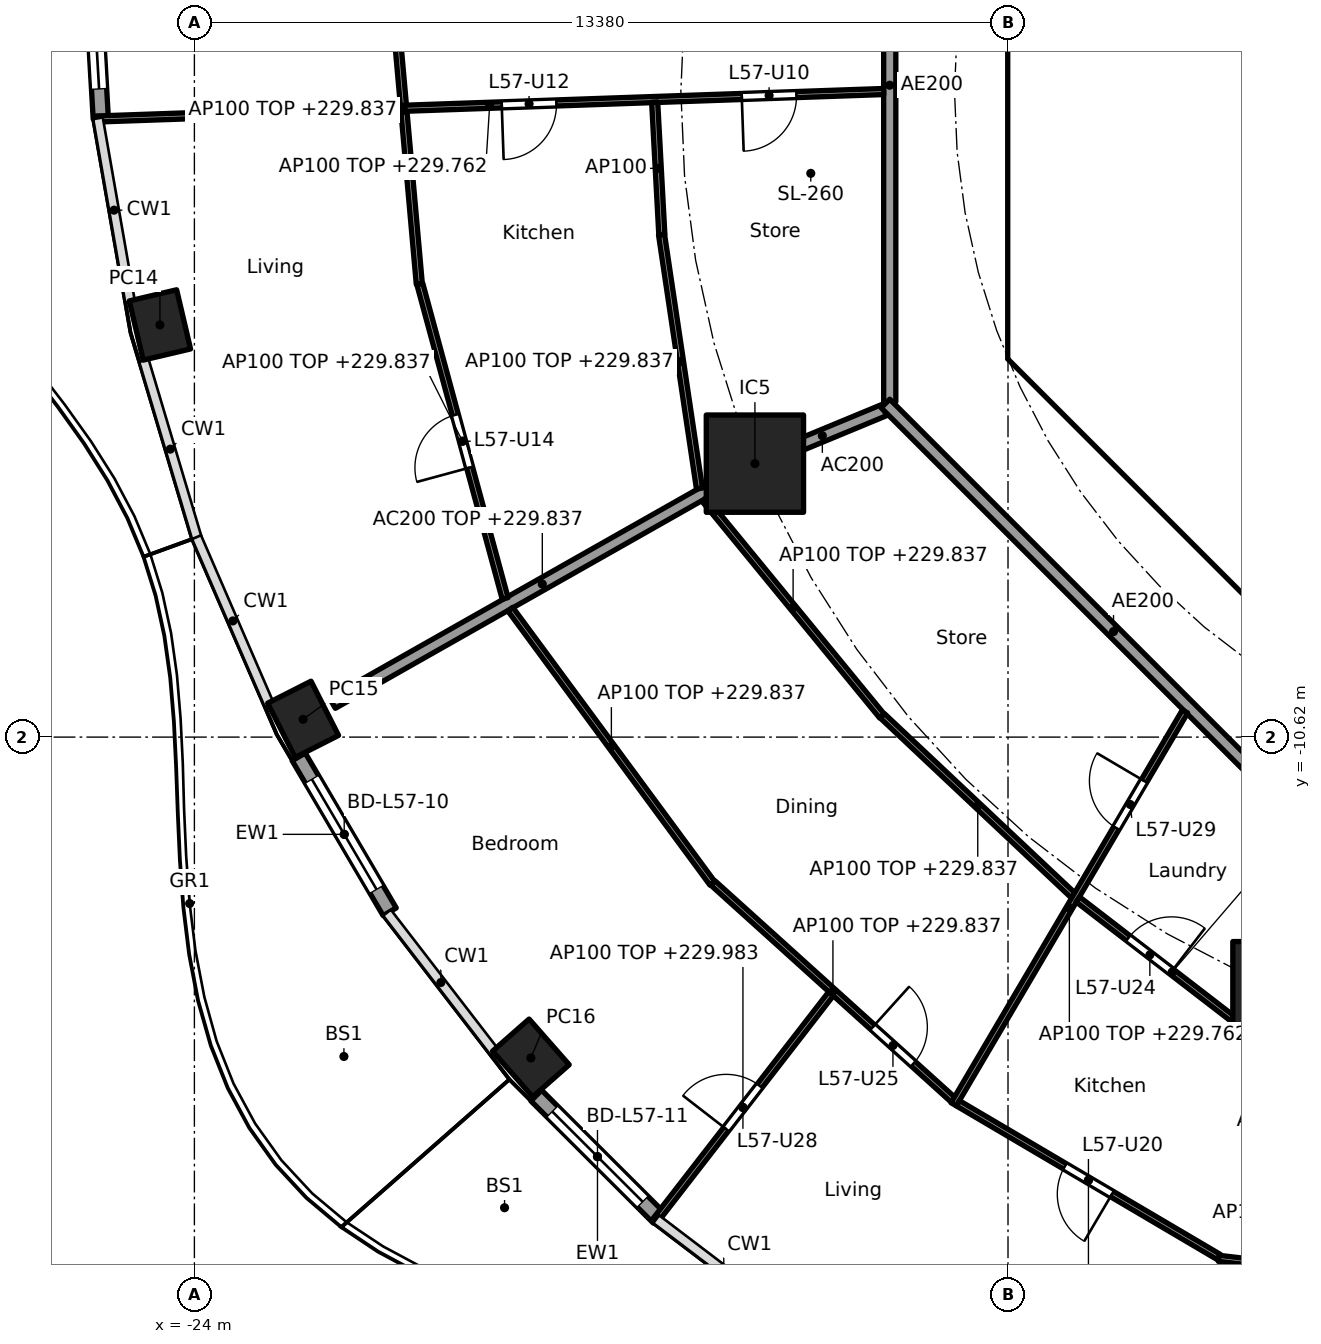
"""IFC4 building model, lengths in metres.
Left out: names, types, materials, properties, quantities, classifications, styles, units other than length and angle.
Written with IfcOpenShell. Run it as: python <this file> out.ifc"""

import sys

from ifc_helpers import new_model, si_unit, direction, frame, frame_2d, origin, origin_2d, place, context, subcontext, project, spatial, polyline, rectangle, hollow_rectangle, outline, extrude, element, fill, save


model = new_model("IFC4")
c1 = context("Model", 3, precision=1e-05, world=origin(), true_north=direction((0.0, 1.0)))
c2 = subcontext(c1, "Body", "Model", "MODEL_VIEW")
j1 = project(units=[si_unit("LENGTHUNIT", "METRE"), si_unit("PLANEANGLEUNIT", "RADIAN")], contexts=[c1])
p1 = place(None, origin())
s1 = spatial("IfcSite", under=j1, at=p1, CompositionType="ELEMENT")
p2 = place(p1, origin())
s2 = spatial("IfcBuilding", under=s1, at=p2, CompositionType="ELEMENT")
p3 = place(p2, frame((0.0, 0.0, 227.0)))
s3 = spatial("IfcBuildingStorey", under=s2, at=p3, CompositionType="ELEMENT", Elevation=227.0)
for number, where, z_axis, x_axis in (
    (1, (-24.567, -3.842, 0.0), (0.0, 0.0, 1.0), (0.229, -0.973, 0.0)),
    (2, (-22.212, -10.327, 0.0), (0.0, 0.0, 1.0), (0.452, -0.892, 0.0)),
    (3, (-18.467, -15.896, 0.0), (0.0, 0.0, 1.0), (0.66, -0.751, 0.0)),
):
    element("IfcColumn", number, at=place(p3, frame(where, z_axis=z_axis, x_axis=x_axis)), inside=s3, PredefinedType="COLUMN", context=c2, shape_type="SweptSolid", body=[
        extrude(hollow_rectangle(XDim=1.0, YDim=0.8, WallThickness=0.032, at=origin_2d()), origin(), (0.0, 0.0, 1.0), 3.7),
    ])
for number, where, z_axis, x_axis in (
    (4, (-14.782, -6.123, 0.0), (0.0, 0.0, 1.0), (1.0, 0.0, 0.0)),
    (5, (-6.123, -14.782, 0.0), (0.0, 0.0, 1.0), (1.0, 0.0, 0.0)),
):
    element("IfcColumn", number, at=place(p3, frame(where, z_axis=z_axis, x_axis=x_axis)), inside=s3, PredefinedType="COLUMN", context=c2, shape_type="SweptSolid", body=[
        extrude(rectangle(XDim=1.6, YDim=1.6, at=origin_2d()), origin(), (0.0, 0.0, 1.0), 3.7),
    ])
p4 = place(p3, frame((-25.539, -0.45, 0.0), z_axis=(0.0, 0.0, 1.0), x_axis=(-0.057528189427, 0.998343882348, 0.0)))
e6 = element("IfcWall", 6, at=p4, inside=s3, PredefinedType="SOLIDWALL", context=c2, shape_type="SweptSolid", body=[
    extrude(rectangle(XDim=3.081, YDim=0.25, at=frame_2d((1.541, 0.0))), origin(), (0.0, 0.0, 1.0), 3.44),
])
p5 = place(p4, frame((0.49, 0.0, 0.0)))
e7 = element("IfcOpeningElement", 7, at=p5, cuts=e6, PredefinedType="OPENING", context=c2, shape_type="SweptSolid", body=[
    extrude(rectangle(XDim=2.1, YDim=2.4, at=frame_2d((1.05, 1.2))), frame((0.0, 0.135, 0.0), z_axis=(0.0, -1.0, 0.0), x_axis=(1.0, 0.0, 0.0)), (0.0, 0.0, 1.0), 0.27),
])
p6 = place(p3, frame((-20.788, -13.493, 0.0), z_axis=(0.0, 0.0, 1.0), x_axis=(-0.506294090973, 0.862360883532, 0.0)))
e8 = element("IfcWall", 8, at=p6, inside=s3, PredefinedType="SOLIDWALL", context=c2, shape_type="SweptSolid", body=[
    extrude(rectangle(XDim=2.955, YDim=0.25, at=frame_2d((1.477, 0.0))), origin(), (0.0, 0.0, 1.0), 3.44),
])
p7 = place(p6, frame((0.427, 0.0, 0.0)))
e9 = element("IfcOpeningElement", 9, at=p7, cuts=e8, PredefinedType="OPENING", context=c2, shape_type="SweptSolid", body=[
    extrude(rectangle(XDim=2.1, YDim=2.4, at=frame_2d((1.05, 1.2))), frame((0.0, 0.135, 0.0), z_axis=(0.0, -1.0, 0.0), x_axis=(1.0, 0.0, 0.0)), (0.0, 0.0, 1.0), 0.27),
])
p8 = place(p3, frame((-16.365, -18.524, 0.0), z_axis=(0.0, 0.0, 1.0), x_axis=(-0.707878871612, 0.706333846793, 0.0)))
e10 = element("IfcWall", 10, at=p8, inside=s3, PredefinedType="SOLIDWALL", context=c2, shape_type="SweptSolid", body=[
    extrude(rectangle(XDim=2.844, YDim=0.25, at=frame_2d((1.422, 0.0))), origin(), (0.0, 0.0, 1.0), 3.44),
])
p9 = place(p8, frame((0.372, 0.0, 0.0)))
e11 = element("IfcOpeningElement", 11, at=p9, cuts=e10, PredefinedType="OPENING", context=c2, shape_type="SweptSolid", body=[
    extrude(rectangle(XDim=2.1, YDim=2.4, at=frame_2d((1.05, 1.2))), frame((0.0, 0.135, 0.0), z_axis=(0.0, -1.0, 0.0), x_axis=(1.0, 0.0, 0.0)), (0.0, 0.0, 1.0), 0.27),
])
p10 = place(p3, frame((-10.325, 3.801, 0.0), z_axis=(0.0, 0.0, 1.0), x_axis=(0.0, -1.0, 0.0)))
e12 = element("IfcWall", 12, at=p10, inside=s3, PredefinedType="SHEAR", context=c2, shape_type="SweptSolid", body=[
    extrude(rectangle(XDim=7.602, YDim=0.6, at=frame_2d((3.801, 0.0))), origin(), (0.0, 0.0, 1.0), 3.44),
])
p11 = place(p10, frame((0.651, 0.0, 0.0)))
e13 = element("IfcOpeningElement", 13, at=p11, cuts=e12, PredefinedType="OPENING", context=c2, shape_type="SweptSolid", body=[
    extrude(rectangle(XDim=1.5, YDim=2.1, at=frame_2d((0.75, 1.05))), frame((0.0, 0.31, 0.0), z_axis=(0.0, -1.0, 0.0), x_axis=(1.0, 0.0, 0.0)), (0.0, 0.0, 1.0), 0.62),
])
p12 = place(p10, frame((5.451, 0.0, 0.0)))
e14 = element("IfcOpeningElement", 14, at=p12, cuts=e12, PredefinedType="OPENING", context=c2, shape_type="SweptSolid", body=[
    extrude(rectangle(XDim=1.5, YDim=2.1, at=frame_2d((0.75, 1.05))), frame((0.0, 0.31, 0.0), z_axis=(0.0, -1.0, 0.0), x_axis=(1.0, 0.0, 0.0)), (0.0, 0.0, 1.0), 0.62),
])
p13 = place(p3, frame((-9.988, -4.613, 0.0), z_axis=(0.0, 0.0, 1.0), x_axis=(0.707106781187, -0.707106781187, 0.0)))
e15 = element("IfcWall", 15, at=p13, inside=s3, PredefinedType="SHEAR", context=c2, shape_type="SweptSolid", body=[
    extrude(rectangle(XDim=7.602, YDim=0.6, at=frame_2d((3.801, 0.0))), origin(), (0.0, 0.0, 1.0), 3.44),
])
p14 = place(p13, frame((6.151, 0.0, 0.0)))
e16 = element("IfcOpeningElement", 16, at=p14, cuts=e15, PredefinedType="OPENING", context=c2, shape_type="SweptSolid", body=[
    extrude(rectangle(XDim=1.1, YDim=2.1, at=frame_2d((0.55, 1.05))), frame((0.0, 0.31, 0.0), z_axis=(0.0, -1.0, 0.0), x_axis=(1.0, 0.0, 0.0)), (0.0, 0.0, 1.0), 0.62),
])
p15 = place(p3, origin())
e17 = element("IfcWall", 17, at=p15, inside=s3, PredefinedType="SHEAR", context=c2, shape_type="SweptSolid", body=[
    extrude(outline(polyline([(-10.625, -3.801), (-10.025, -3.801), (-10.025, -4.152), (-9.776, -4.401), (-10.2, -4.825), (-10.625, -4.401), (-10.625, -3.801)])), origin(), (0.0, 0.0, 1.0), 3.44),
])
p16 = place(p3, frame((-10.025, -4.0, 0.0), z_axis=(0.0, 0.0, 1.0), x_axis=(1.0, 0.0, 0.0)))
e18 = element("IfcWall", 18, at=p16, inside=s3, PredefinedType="PARTITIONING", context=c2, shape_type="SweptSolid", body=[
    extrude(rectangle(XDim=3.325, YDim=0.2, at=frame_2d((1.662, 0.0))), origin(), (0.0, 0.0, 1.0), 3.44),
])
p17 = place(p3, frame((-12.657, -5.243, 0.0), z_axis=(0.0, 0.0, 1.0), x_axis=(-0.923859888513, -0.38273085373, 0.0)))
e19 = element("IfcWall", 19, at=p17, inside=s3, PredefinedType="PARTITIONING", context=c2, shape_type="SweptSolid", body=[
    extrude(rectangle(XDim=2.199, YDim=0.2, at=frame_2d((1.1, 0.0))), origin(), (0.0, 0.0, 1.0), 3.44),
])
p18 = place(p3, frame((-14.825, -6.148, 0.0), z_axis=(0.0, 0.0, 1.0), x_axis=(-0.870099576105, -0.492875975944, 0.0)))
e20 = element("IfcWall", 20, at=p18, inside=s3, PredefinedType="PARTITIONING", context=c2, shape_type="SweptSolid", body=[
    extrude(rectangle(XDim=7.937, YDim=0.2, at=frame_2d((3.969, 0.0))), origin(), (0.0, 0.0, 1.0), 2.837),
])
p19 = place(p3, frame((-12.565, 5.304, 0.0), z_axis=(0.0, 0.0, 1.0), x_axis=(0.0, -1.0, 0.0)))
e21 = element("IfcWall", 21, at=p19, inside=s3, PredefinedType="PARTITIONING", context=c2, shape_type="SweptSolid", body=[
    extrude(rectangle(XDim=10.409, YDim=0.2, at=frame_2d((5.205, 0.0))), origin(), (0.0, 0.0, 1.0), 3.44),
])
p20 = place(p19, frame((3.07, 0.0, 0.0)))
e22 = element("IfcOpeningElement", 22, at=p20, cuts=e21, PredefinedType="OPENING", context=c2, shape_type="SweptSolid", body=[
    extrude(rectangle(XDim=1.0, YDim=2.1, at=frame_2d((0.5, 1.05))), frame((0.0, 0.11, 0.0), z_axis=(0.0, -1.0, 0.0), x_axis=(1.0, 0.0, 0.0)), (0.0, 0.0, 1.0), 0.22),
])
p21 = place(p3, frame((-12.635, -5.134, 0.0), z_axis=(0.0, 0.0, 1.0), x_axis=(0.707106781187, -0.707106781187, 0.0)))
e23 = element("IfcWall", 23, at=p21, inside=s3, PredefinedType="PARTITIONING", context=c2, shape_type="SweptSolid", body=[
    extrude(rectangle(XDim=10.609, YDim=0.2, at=frame_2d((5.305, 0.0))), origin(), (0.0, 0.0, 1.0), 3.44),
])
p22 = place(p3, frame((-20.81, 2.542, 0.0), z_axis=(0.0, 0.0, 1.0), x_axis=(0.088651453697, -0.996062708748, 0.0)))
e24 = element("IfcWall", 24, at=p22, inside=s3, PredefinedType="PARTITIONING", context=c2, shape_type="SweptSolid", body=[
    extrude(rectangle(XDim=5.737, YDim=0.1, at=frame_2d((2.868, 0.0))), origin(), (0.0, 0.0, 1.0), 2.837),
])
p23 = place(p3, frame((-12.665, -0.003, 0.0), z_axis=(0.0, 0.0, 1.0), x_axis=(-0.999390583608, -0.034906466382, 0.0)))
e25 = element("IfcWall", 25, at=p23, inside=s3, PredefinedType="PARTITIONING", context=c2, shape_type="SweptSolid", body=[
    extrude(rectangle(XDim=12.967, YDim=0.1, at=frame_2d((6.483, 0.0))), origin(), (0.0, 0.0, 1.0), 2.762),
])
p24 = place(p23, frame((1.435, 0.0, 0.0)))
e26 = element("IfcOpeningElement", 26, at=p24, cuts=e25, PredefinedType="OPENING", context=c2, shape_type="SweptSolid", body=[
    extrude(rectangle(XDim=0.9, YDim=2.1, at=frame_2d((0.45, 1.05))), frame((0.0, 0.06, 0.0), z_axis=(0.0, -1.0, 0.0), x_axis=(1.0, 0.0, 0.0)), (0.0, 0.0, 1.0), 0.12),
])
p25 = place(p23, frame((5.385, 0.0, 0.0)))
e27 = element("IfcOpeningElement", 27, at=p25, cuts=e25, PredefinedType="OPENING", context=c2, shape_type="SweptSolid", body=[
    extrude(rectangle(XDim=0.9, YDim=2.1, at=frame_2d((0.45, 1.05))), frame((0.0, 0.06, 0.0), z_axis=(0.0, -1.0, 0.0), x_axis=(1.0, 0.0, 0.0)), (0.0, 0.0, 1.0), 0.12),
])
p26 = place(p3, frame((-16.431, -0.178, 0.0), z_axis=(0.0, 0.0, 1.0), x_axis=(0.053951127036, -0.998543577362, 0.0)))
e28 = element("IfcWall", 28, at=p26, inside=s3, PredefinedType="PARTITIONING", context=c2, shape_type="SweptSolid", body=[
    extrude(rectangle(XDim=2.181, YDim=0.1, at=frame_2d((1.091, 0.0))), origin(), (0.0, 0.0, 1.0), 3.44),
])
p27 = place(p3, frame((-16.318, -2.356, 0.0), z_axis=(0.0, 0.0, 1.0), x_axis=(0.147684413341, -0.989034536331, 0.0)))
e29 = element("IfcWall", 29, at=p27, inside=s3, PredefinedType="PARTITIONING", context=c2, shape_type="SweptSolid", body=[
    extrude(rectangle(XDim=4.222, YDim=0.1, at=frame_2d((2.111, 0.0))), origin(), (0.0, 0.0, 1.0), 2.837),
])
p28 = place(p3, frame((-20.292, -3.17, 0.0), z_axis=(0.0, 0.0, 1.0), x_axis=(0.26187906236, -0.965100697698, 0.0)))
e30 = element("IfcWall", 30, at=p28, inside=s3, PredefinedType="PARTITIONING", context=c2, shape_type="SweptSolid", body=[
    extrude(rectangle(XDim=5.356, YDim=0.1, at=frame_2d((2.678, 0.0))), origin(), (0.0, 0.0, 1.0), 2.837),
])
p29 = place(p28, frame((2.228, 0.0, 0.0)))
e31 = element("IfcOpeningElement", 31, at=p29, cuts=e30, PredefinedType="OPENING", context=c2, shape_type="SweptSolid", body=[
    extrude(rectangle(XDim=0.9, YDim=2.1, at=frame_2d((0.45, 1.05))), frame((0.0, 0.06, 0.0), z_axis=(0.0, -1.0, 0.0), x_axis=(1.0, 0.0, 0.0)), (0.0, 0.0, 1.0), 0.12),
])
p30 = place(p3, frame((-15.616, -6.708, 0.0), z_axis=(0.0, 0.0, 1.0), x_axis=(0.634076422357, -0.773270386483, 0.0)))
e32 = element("IfcWall", 32, at=p30, inside=s3, PredefinedType="PARTITIONING", context=c2, shape_type="SweptSolid", body=[
    extrude(rectangle(XDim=4.611, YDim=0.1, at=frame_2d((2.306, 0.0))), origin(), (0.0, 0.0, 1.0), 2.837),
])
p31 = place(p3, frame((-18.804, -8.516, 0.0), z_axis=(0.0, 0.0, 1.0), x_axis=(0.593249583583, -0.805018590828, 0.0)))
e33 = element("IfcWall", 33, at=p31, inside=s3, PredefinedType="PARTITIONING", context=c2, shape_type="SweptSolid", body=[
    extrude(rectangle(XDim=5.602, YDim=0.1, at=frame_2d((2.801, 0.0))), origin(), (0.0, 0.0, 1.0), 2.837),
])
p32 = place(p3, frame((-12.688, -10.27, 0.0), z_axis=(0.0, 0.0, 1.0), x_axis=(0.728268142903, -0.685292282192, 0.0)))
e34 = element("IfcWall", 34, at=p32, inside=s3, PredefinedType="PARTITIONING", context=c2, shape_type="SweptSolid", body=[
    extrude(rectangle(XDim=4.312, YDim=0.1, at=frame_2d((2.156, 0.0))), origin(), (0.0, 0.0, 1.0), 2.837),
])
p33 = place(p3, frame((-15.474, -13.019, 0.0), z_axis=(0.0, 0.0, 1.0), x_axis=(0.742348572616, -0.670013878017, 0.0)))
e35 = element("IfcWall", 35, at=p33, inside=s3, PredefinedType="PARTITIONING", context=c2, shape_type="SweptSolid", body=[
    extrude(rectangle(XDim=5.319, YDim=0.1, at=frame_2d((2.66, 0.0))), origin(), (0.0, 0.0, 1.0), 2.837),
])
p34 = place(p33, frame((3.54, 0.0, 0.0)))
e36 = element("IfcOpeningElement", 36, at=p34, cuts=e35, PredefinedType="OPENING", context=c2, shape_type="SweptSolid", body=[
    extrude(rectangle(XDim=0.9, YDim=2.1, at=frame_2d((0.45, 1.05))), frame((0.0, 0.06, 0.0), z_axis=(0.0, -1.0, 0.0), x_axis=(1.0, 0.0, 0.0)), (0.0, 0.0, 1.0), 0.12),
])
p35 = place(p3, frame((-13.53, -14.84, 0.0), z_axis=(0.0, 0.0, 1.0), x_axis=(-0.612546685222, -0.790434411209, 0.0)))
e37 = element("IfcWall", 37, at=p35, inside=s3, PredefinedType="PARTITIONING", context=c2, shape_type="SweptSolid", body=[
    extrude(rectangle(XDim=4.732, YDim=0.1, at=frame_2d((2.366, 0.0))), origin(), (0.0, 0.0, 1.0), 2.983),
])
p36 = place(p35, frame((1.916, 0.0, 0.0)))
e38 = element("IfcOpeningElement", 38, at=p36, cuts=e37, PredefinedType="OPENING", context=c2, shape_type="SweptSolid", body=[
    extrude(rectangle(XDim=0.9, YDim=2.1, at=frame_2d((0.45, 1.05))), frame((0.0, 0.06, 0.0), z_axis=(0.0, -1.0, 0.0), x_axis=(1.0, 0.0, 0.0)), (0.0, 0.0, 1.0), 0.12),
])
p37 = place(p3, frame((-7.709, -10.198, 0.0), z_axis=(0.0, 0.0, 1.0), x_axis=(-0.507362999545, -0.861732433353, 0.0)))
e39 = element("IfcWall", 39, at=p37, inside=s3, PredefinedType="PARTITIONING", context=c2, shape_type="SweptSolid", body=[
    extrude(rectangle(XDim=7.499, YDim=0.1, at=frame_2d((3.749, 0.0))), origin(), (0.0, 0.0, 1.0), 2.762),
])
p38 = place(p37, frame((1.326, 0.0, 0.0)))
e40 = element("IfcOpeningElement", 40, at=p38, cuts=e39, PredefinedType="OPENING", context=c2, shape_type="SweptSolid", body=[
    extrude(rectangle(XDim=0.9, YDim=2.1, at=frame_2d((0.45, 1.05))), frame((0.0, 0.06, 0.0), z_axis=(0.0, -1.0, 0.0), x_axis=(1.0, 0.0, 0.0)), (0.0, 0.0, 1.0), 0.12),
])
p39 = place(p3, frame((-9.471, -13.289, 0.0), z_axis=(0.0, 0.0, 1.0), x_axis=(0.7922205419, -0.61023488346, 0.0)))
e41 = element("IfcWall", 41, at=p39, inside=s3, PredefinedType="PARTITIONING", context=c2, shape_type="SweptSolid", body=[
    extrude(rectangle(XDim=3.916, YDim=0.1, at=frame_2d((1.958, 0.0))), origin(), (0.0, 0.0, 1.0), 2.837),
])
p40 = place(p39, frame((1.045, 0.0, 0.0)))
e42 = element("IfcOpeningElement", 42, at=p40, cuts=e41, PredefinedType="OPENING", context=c2, shape_type="SweptSolid", body=[
    extrude(rectangle(XDim=0.9, YDim=2.1, at=frame_2d((0.45, 1.05))), frame((0.0, 0.06, 0.0), z_axis=(0.0, -1.0, 0.0), x_axis=(1.0, 0.0, 0.0)), (0.0, 0.0, 1.0), 0.12),
])
p41 = place(p3, frame((-11.445, -16.641, 0.0), z_axis=(0.0, 0.0, 1.0), x_axis=(0.861562560957, -0.507651409489, 0.0)))
e43 = element("IfcWall", 43, at=p41, inside=s3, PredefinedType="PARTITIONING", context=c2, shape_type="SweptSolid", body=[
    extrude(rectangle(XDim=4.985, YDim=0.1, at=frame_2d((2.492, 0.0))), origin(), (0.0, 0.0, 1.0), 2.837),
])
p42 = place(p41, frame((2.042, 0.0, 0.0)))
e44 = element("IfcOpeningElement", 44, at=p42, cuts=e43, PredefinedType="OPENING", context=c2, shape_type="SweptSolid", body=[
    extrude(rectangle(XDim=0.9, YDim=2.1, at=frame_2d((0.45, 1.05))), frame((0.0, 0.06, 0.0), z_axis=(0.0, -1.0, 0.0), x_axis=(1.0, 0.0, 0.0)), (0.0, 0.0, 1.0), 0.12),
])
p43 = place(p3, frame((-7.156, -19.191, 0.0), z_axis=(0.0, 0.0, 1.0), x_axis=(0.993172627718, -0.116653896424, 0.0)))
e45 = element("IfcWall", 45, at=p43, inside=s3, PredefinedType="PARTITIONING", context=c2, shape_type="SweptSolid", body=[
    extrude(rectangle(XDim=5.368, YDim=0.1, at=frame_2d((2.684, 0.0))), origin(), (0.0, 0.0, 1.0), 2.837),
])
p44 = place(p5, origin())
e46 = element("IfcDoor", 46, at=p44, inside=s3, OperationType="SLIDING_TO_LEFT", PredefinedType="DOOR", context=c2, shape_type="SweptSolid", body=[
    extrude(rectangle(XDim=2.1, YDim=2.4, at=frame_2d((1.05, 1.2))), frame((0.0, 0.025, 0.0), z_axis=(0.0, -1.0, 0.0), x_axis=(1.0, 0.0, 0.0)), (0.0, 0.0, 1.0), 0.05),
])
fill(e7, e46)
p45 = place(p7, origin())
e47 = element("IfcDoor", 47, at=p45, inside=s3, OperationType="SLIDING_TO_LEFT", PredefinedType="DOOR", context=c2, shape_type="SweptSolid", body=[
    extrude(rectangle(XDim=2.1, YDim=2.4, at=frame_2d((1.05, 1.2))), frame((0.0, 0.025, 0.0), z_axis=(0.0, -1.0, 0.0), x_axis=(1.0, 0.0, 0.0)), (0.0, 0.0, 1.0), 0.05),
])
fill(e9, e47)
p46 = place(p9, origin())
e48 = element("IfcDoor", 48, at=p46, inside=s3, OperationType="SLIDING_TO_LEFT", PredefinedType="DOOR", context=c2, shape_type="SweptSolid", body=[
    extrude(rectangle(XDim=2.1, YDim=2.4, at=frame_2d((1.05, 1.2))), frame((0.0, 0.025, 0.0), z_axis=(0.0, -1.0, 0.0), x_axis=(1.0, 0.0, 0.0)), (0.0, 0.0, 1.0), 0.05),
])
fill(e11, e48)
p47 = place(p12, origin())
e49 = element("IfcDoor", 49, at=p47, inside=s3, OperationType="DOUBLE_DOOR_SINGLE_SWING", PredefinedType="DOOR", context=c2, shape_type="SweptSolid", body=[
    extrude(rectangle(XDim=1.5, YDim=2.1, at=frame_2d((0.75, 1.05))), frame((0.0, 0.025, 0.0), z_axis=(0.0, -1.0, 0.0), x_axis=(1.0, 0.0, 0.0)), (0.0, 0.0, 1.0), 0.05),
])
fill(e14, e49)
p48 = place(p24, origin())
e50 = element("IfcDoor", 50, at=p48, inside=s3, OperationType="SINGLE_SWING_RIGHT", PredefinedType="DOOR", context=c2, shape_type="SweptSolid", body=[
    extrude(rectangle(XDim=0.9, YDim=2.1, at=frame_2d((0.45, 1.05))), frame((0.0, 0.025, 0.0), z_axis=(0.0, -1.0, 0.0), x_axis=(1.0, 0.0, 0.0)), (0.0, 0.0, 1.0), 0.05),
])
fill(e26, e50)
p49 = place(p25, origin())
e51 = element("IfcDoor", 51, at=p49, inside=s3, OperationType="SINGLE_SWING_RIGHT", PredefinedType="DOOR", context=c2, shape_type="SweptSolid", body=[
    extrude(rectangle(XDim=0.9, YDim=2.1, at=frame_2d((0.45, 1.05))), frame((0.0, 0.025, 0.0), z_axis=(0.0, -1.0, 0.0), x_axis=(1.0, 0.0, 0.0)), (0.0, 0.0, 1.0), 0.05),
])
fill(e27, e51)
p50 = place(p29, frame((0.9, 0.0, 0.0), x_axis=(-1.0, 0.0, 0.0)))
e52 = element("IfcDoor", 52, at=p50, inside=s3, OperationType="SINGLE_SWING_LEFT", PredefinedType="DOOR", context=c2, shape_type="SweptSolid", body=[
    extrude(rectangle(XDim=0.9, YDim=2.1, at=frame_2d((0.45, 1.05))), frame((0.0, 0.025, 0.0), z_axis=(0.0, -1.0, 0.0), x_axis=(1.0, 0.0, 0.0)), (0.0, 0.0, 1.0), 0.05),
])
fill(e31, e52)
p51 = place(p42, frame((0.9, 0.0, 0.0), x_axis=(-1.0, 0.0, 0.0)))
e53 = element("IfcDoor", 53, at=p51, inside=s3, OperationType="SINGLE_SWING_LEFT", PredefinedType="DOOR", context=c2, shape_type="SweptSolid", body=[
    extrude(rectangle(XDim=0.9, YDim=2.1, at=frame_2d((0.45, 1.05))), frame((0.0, 0.025, 0.0), z_axis=(0.0, -1.0, 0.0), x_axis=(1.0, 0.0, 0.0)), (0.0, 0.0, 1.0), 0.05),
])
fill(e44, e53)
p52 = place(p40, origin())
e54 = element("IfcDoor", 54, at=p52, inside=s3, OperationType="SINGLE_SWING_RIGHT", PredefinedType="DOOR", context=c2, shape_type="SweptSolid", body=[
    extrude(rectangle(XDim=0.9, YDim=2.1, at=frame_2d((0.45, 1.05))), frame((0.0, 0.025, 0.0), z_axis=(0.0, -1.0, 0.0), x_axis=(1.0, 0.0, 0.0)), (0.0, 0.0, 1.0), 0.05),
])
fill(e42, e54)
p53 = place(p34, origin())
e55 = element("IfcDoor", 55, at=p53, inside=s3, OperationType="SINGLE_SWING_LEFT", PredefinedType="DOOR", context=c2, shape_type="SweptSolid", body=[
    extrude(rectangle(XDim=0.9, YDim=2.1, at=frame_2d((0.45, 1.05))), frame((0.0, 0.025, 0.0), z_axis=(0.0, -1.0, 0.0), x_axis=(1.0, 0.0, 0.0)), (0.0, 0.0, 1.0), 0.05),
])
fill(e36, e55)
p54 = place(p36, frame((0.9, 0.0, 0.0), x_axis=(-1.0, 0.0, 0.0)))
e56 = element("IfcDoor", 56, at=p54, inside=s3, OperationType="SINGLE_SWING_LEFT", PredefinedType="DOOR", context=c2, shape_type="SweptSolid", body=[
    extrude(rectangle(XDim=0.9, YDim=2.1, at=frame_2d((0.45, 1.05))), frame((0.0, 0.025, 0.0), z_axis=(0.0, -1.0, 0.0), x_axis=(1.0, 0.0, 0.0)), (0.0, 0.0, 1.0), 0.05),
])
fill(e38, e56)
p55 = place(p38, frame((0.9, 0.0, 0.0), x_axis=(-1.0, 0.0, 0.0)))
e57 = element("IfcDoor", 57, at=p55, inside=s3, OperationType="SINGLE_SWING_RIGHT", PredefinedType="DOOR", context=c2, shape_type="SweptSolid", body=[
    extrude(rectangle(XDim=0.9, YDim=2.1, at=frame_2d((0.45, 1.05))), frame((0.0, 0.025, 0.0), z_axis=(0.0, -1.0, 0.0), x_axis=(1.0, 0.0, 0.0)), (0.0, 0.0, 1.0), 0.05),
])
fill(e40, e57)
save(model, sys.argv[1])
